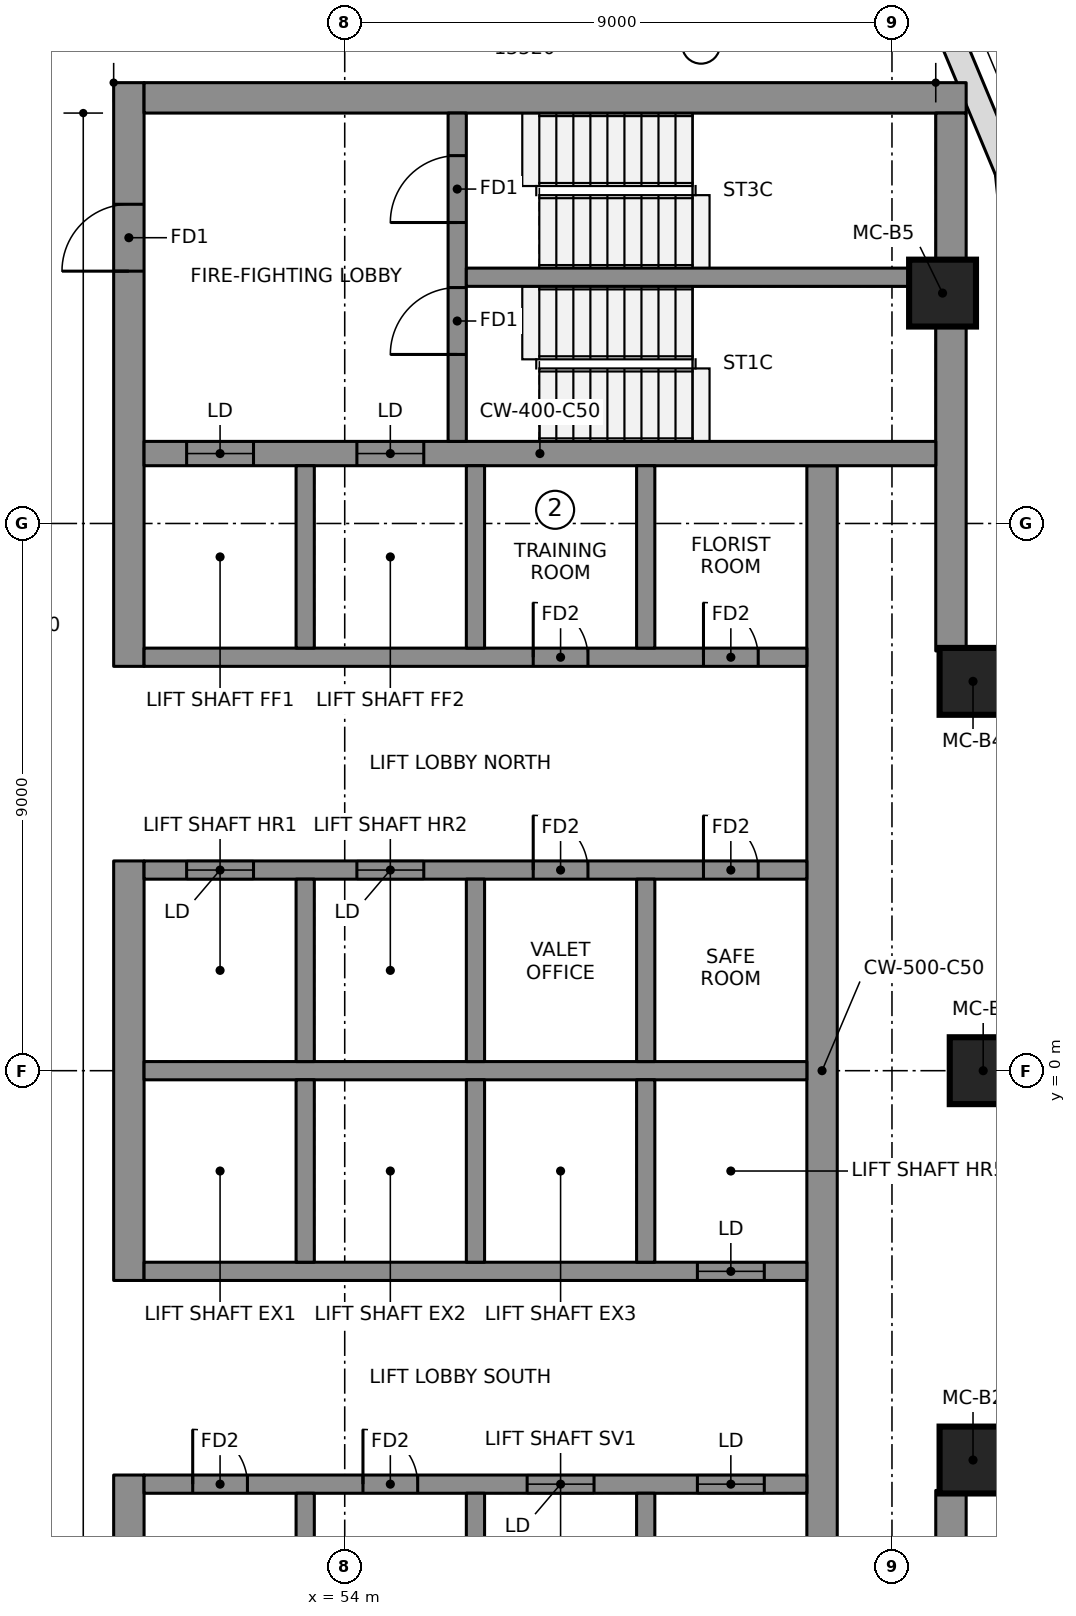
"""IFC4 building model, lengths in metres.
Left out: names, types, materials, properties, quantities, classifications, styles, units other than length and angle.
Written with IfcOpenShell. Run it as: python <this file> out.ifc"""

import sys

from ifc_helpers import new_model, si_unit, direction, frame, frame_2d, origin, origin_2d, place, context, subcontext, project, spatial, polyline, rectangle, outline, extrude, element, fill, save


model = new_model("IFC4")
c1 = context("Model", 3, precision=1e-05, world=origin(), true_north=direction((0.0, 1.0)))
c2 = subcontext(c1, "Body", "Model", "MODEL_VIEW")
j1 = project(units=[si_unit("LENGTHUNIT", "METRE"), si_unit("PLANEANGLEUNIT", "RADIAN")], contexts=[c1])
p1 = place(None, origin())
s1 = spatial("IfcSite", under=j1, at=p1, CompositionType="ELEMENT")
p2 = place(p1, origin())
s2 = spatial("IfcBuilding", under=s1, at=p2, CompositionType="ELEMENT")
p3 = place(p2, frame((0.0, 0.0, 278.55)))
s3 = spatial("IfcBuildingStorey", under=s2, at=p3, CompositionType="ELEMENT", Elevation=278.55)
p4 = place(p3, frame((50.45, 6.65, 0.0), z_axis=(0.0, 0.0, 1.0), x_axis=(0.0, 1.0, 0.0)))
e1 = element("IfcWall", 1, at=p4, inside=s3, PredefinedType="SHEAR", context=c2, shape_type="SweptSolid", body=[
    extrude(rectangle(XDim=9.6, YDim=0.5, at=frame_2d((4.8, 0.0))), origin(), (0.0, 0.0, 1.0), 3.55),
])
p5 = place(p4, frame((6.5, 0.0, 0.0)))
e2 = element("IfcOpeningElement", 2, at=p5, cuts=e1, PredefinedType="OPENING", context=c2, shape_type="SweptSolid", body=[
    extrude(rectangle(XDim=1.1, YDim=2.1, at=frame_2d((0.55, 1.05))), frame((0.0, 0.26, 0.0), z_axis=(0.0, -1.0, 0.0), x_axis=(1.0, 0.0, 0.0)), (0.0, 0.0, 1.0), 0.52),
])
p6 = place(p3, frame((50.45, -3.45, 0.0), z_axis=(0.0, 0.0, 1.0), x_axis=(0.0, 1.0, 0.0)))
e3 = element("IfcWall", 3, at=p6, inside=s3, PredefinedType="SHEAR", context=c2, shape_type="SweptSolid", body=[
    extrude(rectangle(XDim=6.9, YDim=0.5, at=frame_2d((3.45, 0.0))), origin(), (0.0, 0.0, 1.0), 3.55),
])
p7 = place(p3, frame((50.45, -16.25, 0.0), z_axis=(0.0, 0.0, 1.0), x_axis=(0.0, 1.0, 0.0)))
e4 = element("IfcWall", 4, at=p7, inside=s3, PredefinedType="SHEAR", context=c2, shape_type="SweptSolid", body=[
    extrude(rectangle(XDim=9.6, YDim=0.5, at=frame_2d((4.8, 0.0))), origin(), (0.0, 0.0, 1.0), 3.55),
])
p8 = place(p7, frame((2.0, 0.0, 0.0)))
e5 = element("IfcOpeningElement", 5, at=p8, cuts=e4, PredefinedType="OPENING", context=c2, shape_type="SweptSolid", body=[
    extrude(rectangle(XDim=1.1, YDim=2.1, at=frame_2d((0.55, 1.05))), frame((0.0, 0.26, 0.0), z_axis=(0.0, -1.0, 0.0), x_axis=(1.0, 0.0, 0.0)), (0.0, 0.0, 1.0), 0.52),
])
p9 = place(p3, frame((50.7, 16.0, 0.0), z_axis=(0.0, 0.0, 1.0), x_axis=(1.0, 0.0, 0.0)))
e6 = element("IfcWall", 6, at=p9, inside=s3, PredefinedType="SHEAR", context=c2, shape_type="SweptSolid", body=[
    extrude(rectangle(XDim=13.52, YDim=0.5, at=frame_2d((6.76, 0.0))), origin(), (0.0, 0.0, 1.0), 3.55),
])
for number, where, z_axis, x_axis in (
    (7, (63.97, 6.903, 0.0), (0.0, 0.0, 1.0), (0.0, 1.0, 0.0)),
    (8, (63.97, -15.75, 0.0), (0.0, 0.0, 1.0), (0.0, 1.0, 0.0)),
):
    element("IfcWall", number, at=place(p3, frame(where, z_axis=z_axis, x_axis=x_axis)), inside=s3, PredefinedType="SHEAR", context=c2, shape_type="SweptSolid", body=[
        extrude(rectangle(XDim=8.847, YDim=0.5, at=frame_2d((4.423, 0.0))), origin(), (0.0, 0.0, 1.0), 3.55),
    ])
p10 = place(p3, frame((61.85, -9.95, 0.0), z_axis=(0.0, 0.0, 1.0), x_axis=(0.0, 1.0, 0.0)))
e9 = element("IfcWall", 9, at=p10, inside=s3, PredefinedType="SHEAR", context=c2, shape_type="SweptSolid", body=[
    extrude(rectangle(XDim=19.9, YDim=0.5, at=frame_2d((9.95, 0.0))), origin(), (0.0, 0.0, 1.0), 3.55),
])
p11 = place(p3, frame((50.7, 10.15, 0.0), z_axis=(0.0, 0.0, 1.0), x_axis=(1.0, 0.0, 0.0)))
e10 = element("IfcWall", 10, at=p11, inside=s3, PredefinedType="SHEAR", context=c2, shape_type="SweptSolid", body=[
    extrude(rectangle(XDim=13.02, YDim=0.4, at=frame_2d((6.51, 0.0))), origin(), (0.0, 0.0, 1.0), 3.55),
])
p12 = place(p11, frame((0.7, 0.0, 0.0)))
e11 = element("IfcOpeningElement", 11, at=p12, cuts=e10, PredefinedType="OPENING", context=c2, shape_type="SweptSolid", body=[
    extrude(rectangle(XDim=1.1, YDim=2.1, at=frame_2d((0.55, 1.05))), frame((0.0, 0.21, 0.0), z_axis=(0.0, -1.0, 0.0), x_axis=(1.0, 0.0, 0.0)), (0.0, 0.0, 1.0), 0.42),
])
p13 = place(p11, frame((3.5, 0.0, 0.0)))
e12 = element("IfcOpeningElement", 12, at=p13, cuts=e10, PredefinedType="OPENING", context=c2, shape_type="SweptSolid", body=[
    extrude(rectangle(XDim=1.1, YDim=2.1, at=frame_2d((0.55, 1.05))), frame((0.0, 0.21, 0.0), z_axis=(0.0, -1.0, 0.0), x_axis=(1.0, 0.0, 0.0)), (0.0, 0.0, 1.0), 0.42),
])
p14 = place(p3, frame((50.7, 0.0, 0.0), z_axis=(0.0, 0.0, 1.0), x_axis=(1.0, 0.0, 0.0)))
e13 = element("IfcWall", 13, at=p14, inside=s3, PredefinedType="SHEAR", context=c2, shape_type="SweptSolid", body=[
    extrude(rectangle(XDim=10.9, YDim=0.3, at=frame_2d((5.45, 0.0))), origin(), (0.0, 0.0, 1.0), 3.55),
])
p15 = place(p3, frame((50.7, 3.3, 0.0), z_axis=(0.0, 0.0, 1.0), x_axis=(1.0, 0.0, 0.0)))
e14 = element("IfcWall", 14, at=p15, inside=s3, PredefinedType="SHEAR", context=c2, shape_type="SweptSolid", body=[
    extrude(rectangle(XDim=10.9, YDim=0.3, at=frame_2d((5.45, 0.0))), origin(), (0.0, 0.0, 1.0), 3.55),
])
p16 = place(p15, frame((0.7, 0.0, 0.0)))
e15 = element("IfcOpeningElement", 15, at=p16, cuts=e14, PredefinedType="OPENING", context=c2, shape_type="SweptSolid", body=[
    extrude(rectangle(XDim=1.1, YDim=2.1, at=frame_2d((0.55, 1.05))), frame((0.0, 0.16, 0.0), z_axis=(0.0, -1.0, 0.0), x_axis=(1.0, 0.0, 0.0)), (0.0, 0.0, 1.0), 0.32),
])
p17 = place(p15, frame((3.5, 0.0, 0.0)))
e16 = element("IfcOpeningElement", 16, at=p17, cuts=e14, PredefinedType="OPENING", context=c2, shape_type="SweptSolid", body=[
    extrude(rectangle(XDim=1.1, YDim=2.1, at=frame_2d((0.55, 1.05))), frame((0.0, 0.16, 0.0), z_axis=(0.0, -1.0, 0.0), x_axis=(1.0, 0.0, 0.0)), (0.0, 0.0, 1.0), 0.32),
])
p18 = place(p15, frame((6.4, 0.0, 0.0)))
e17 = element("IfcOpeningElement", 17, at=p18, cuts=e14, PredefinedType="OPENING", context=c2, shape_type="SweptSolid", body=[
    extrude(rectangle(XDim=0.9, YDim=2.1, at=frame_2d((0.45, 1.05))), frame((0.0, 0.16, 0.0), z_axis=(0.0, -1.0, 0.0), x_axis=(1.0, 0.0, 0.0)), (0.0, 0.0, 1.0), 0.32),
])
p19 = place(p15, frame((9.2, 0.0, 0.0)))
e18 = element("IfcOpeningElement", 18, at=p19, cuts=e14, PredefinedType="OPENING", context=c2, shape_type="SweptSolid", body=[
    extrude(rectangle(XDim=0.9, YDim=2.1, at=frame_2d((0.45, 1.05))), frame((0.0, 0.16, 0.0), z_axis=(0.0, -1.0, 0.0), x_axis=(1.0, 0.0, 0.0)), (0.0, 0.0, 1.0), 0.32),
])
p20 = place(p3, frame((50.7, 6.8, 0.0), z_axis=(0.0, 0.0, 1.0), x_axis=(1.0, 0.0, 0.0)))
e19 = element("IfcWall", 19, at=p20, inside=s3, PredefinedType="SHEAR", context=c2, shape_type="SweptSolid", body=[
    extrude(rectangle(XDim=10.9, YDim=0.3, at=frame_2d((5.45, 0.0))), origin(), (0.0, 0.0, 1.0), 3.55),
])
p21 = place(p20, frame((6.4, 0.0, 0.0)))
e20 = element("IfcOpeningElement", 20, at=p21, cuts=e19, PredefinedType="OPENING", context=c2, shape_type="SweptSolid", body=[
    extrude(rectangle(XDim=0.9, YDim=2.1, at=frame_2d((0.45, 1.05))), frame((0.0, 0.16, 0.0), z_axis=(0.0, -1.0, 0.0), x_axis=(1.0, 0.0, 0.0)), (0.0, 0.0, 1.0), 0.32),
])
p22 = place(p20, frame((9.2, 0.0, 0.0)))
e21 = element("IfcOpeningElement", 21, at=p22, cuts=e19, PredefinedType="OPENING", context=c2, shape_type="SweptSolid", body=[
    extrude(rectangle(XDim=0.9, YDim=2.1, at=frame_2d((0.45, 1.05))), frame((0.0, 0.16, 0.0), z_axis=(0.0, -1.0, 0.0), x_axis=(1.0, 0.0, 0.0)), (0.0, 0.0, 1.0), 0.32),
])
for number, where, z_axis, x_axis in (
    (22, (53.35, 0.15, 0.0), (0.0, 0.0, 1.0), (0.0, 1.0, 0.0)),
    (23, (53.35, 6.95, 0.0), (0.0, 0.0, 1.0), (0.0, 1.0, 0.0)),
    (24, (56.15, 0.15, 0.0), (0.0, 0.0, 1.0), (0.0, 1.0, 0.0)),
    (25, (56.15, 6.95, 0.0), (0.0, 0.0, 1.0), (0.0, 1.0, 0.0)),
    (26, (58.95, 0.15, 0.0), (0.0, 0.0, 1.0), (0.0, 1.0, 0.0)),
    (27, (58.95, 6.95, 0.0), (0.0, 0.0, 1.0), (0.0, 1.0, 0.0)),
):
    element("IfcWall", number, at=place(p3, frame(where, z_axis=z_axis, x_axis=x_axis)), inside=s3, PredefinedType="SHEAR", context=c2, shape_type="SweptSolid", body=[
        extrude(rectangle(XDim=3.0, YDim=0.3, at=frame_2d((1.5, 0.0))), origin(), (0.0, 0.0, 1.0), 3.55),
    ])
p23 = place(p3, frame((50.7, -3.3, 0.0), z_axis=(0.0, 0.0, 1.0), x_axis=(1.0, 0.0, 0.0)))
e28 = element("IfcWall", 28, at=p23, inside=s3, PredefinedType="SHEAR", context=c2, shape_type="SweptSolid", body=[
    extrude(rectangle(XDim=10.9, YDim=0.3, at=frame_2d((5.45, 0.0))), origin(), (0.0, 0.0, 1.0), 3.55),
])
p24 = place(p23, frame((9.1, 0.0, 0.0)))
e29 = element("IfcOpeningElement", 29, at=p24, cuts=e28, PredefinedType="OPENING", context=c2, shape_type="SweptSolid", body=[
    extrude(rectangle(XDim=1.1, YDim=2.1, at=frame_2d((0.55, 1.05))), frame((0.0, 0.16, 0.0), z_axis=(0.0, -1.0, 0.0), x_axis=(1.0, 0.0, 0.0)), (0.0, 0.0, 1.0), 0.32),
])
p25 = place(p3, frame((50.7, -6.8, 0.0), z_axis=(0.0, 0.0, 1.0), x_axis=(1.0, 0.0, 0.0)))
e30 = element("IfcWall", 30, at=p25, inside=s3, PredefinedType="SHEAR", context=c2, shape_type="SweptSolid", body=[
    extrude(rectangle(XDim=10.9, YDim=0.3, at=frame_2d((5.45, 0.0))), origin(), (0.0, 0.0, 1.0), 3.55),
])
p26 = place(p25, frame((6.3, 0.0, 0.0)))
e31 = element("IfcOpeningElement", 31, at=p26, cuts=e30, PredefinedType="OPENING", context=c2, shape_type="SweptSolid", body=[
    extrude(rectangle(XDim=1.1, YDim=2.1, at=frame_2d((0.55, 1.05))), frame((0.0, 0.16, 0.0), z_axis=(0.0, -1.0, 0.0), x_axis=(1.0, 0.0, 0.0)), (0.0, 0.0, 1.0), 0.32),
])
p27 = place(p25, frame((9.1, 0.0, 0.0)))
e32 = element("IfcOpeningElement", 32, at=p27, cuts=e30, PredefinedType="OPENING", context=c2, shape_type="SweptSolid", body=[
    extrude(rectangle(XDim=1.1, YDim=2.1, at=frame_2d((0.55, 1.05))), frame((0.0, 0.16, 0.0), z_axis=(0.0, -1.0, 0.0), x_axis=(1.0, 0.0, 0.0)), (0.0, 0.0, 1.0), 0.32),
])
p28 = place(p25, frame((0.8, 0.0, 0.0)))
e33 = element("IfcOpeningElement", 33, at=p28, cuts=e30, PredefinedType="OPENING", context=c2, shape_type="SweptSolid", body=[
    extrude(rectangle(XDim=0.9, YDim=2.1, at=frame_2d((0.45, 1.05))), frame((0.0, 0.16, 0.0), z_axis=(0.0, -1.0, 0.0), x_axis=(1.0, 0.0, 0.0)), (0.0, 0.0, 1.0), 0.32),
])
p29 = place(p25, frame((3.6, 0.0, 0.0)))
e34 = element("IfcOpeningElement", 34, at=p29, cuts=e30, PredefinedType="OPENING", context=c2, shape_type="SweptSolid", body=[
    extrude(rectangle(XDim=0.9, YDim=2.1, at=frame_2d((0.45, 1.05))), frame((0.0, 0.16, 0.0), z_axis=(0.0, -1.0, 0.0), x_axis=(1.0, 0.0, 0.0)), (0.0, 0.0, 1.0), 0.32),
])
for number, where, z_axis, x_axis in (
    (35, (53.35, -3.15, 0.0), (0.0, 0.0, 1.0), (0.0, 1.0, 0.0)),
    (36, (53.35, -9.95, 0.0), (0.0, 0.0, 1.0), (0.0, 1.0, 0.0)),
    (37, (56.15, -3.15, 0.0), (0.0, 0.0, 1.0), (0.0, 1.0, 0.0)),
    (38, (56.15, -9.95, 0.0), (0.0, 0.0, 1.0), (0.0, 1.0, 0.0)),
    (39, (58.95, -3.15, 0.0), (0.0, 0.0, 1.0), (0.0, 1.0, 0.0)),
    (40, (58.95, -9.95, 0.0), (0.0, 0.0, 1.0), (0.0, 1.0, 0.0)),
):
    element("IfcWall", number, at=place(p3, frame(where, z_axis=z_axis, x_axis=x_axis)), inside=s3, PredefinedType="SHEAR", context=c2, shape_type="SweptSolid", body=[
        extrude(rectangle(XDim=3.0, YDim=0.3, at=frame_2d((1.5, 0.0))), origin(), (0.0, 0.0, 1.0), 3.55),
    ])
p30 = place(p3, frame((55.85, 10.35, 0.0), z_axis=(0.0, 0.0, 1.0), x_axis=(0.0, 1.0, 0.0)))
e41 = element("IfcWall", 41, at=p30, inside=s3, PredefinedType="SHEAR", context=c2, shape_type="SweptSolid", body=[
    extrude(rectangle(XDim=5.4, YDim=0.3, at=frame_2d((2.7, 0.0))), origin(), (0.0, 0.0, 1.0), 3.55),
])
p31 = place(p30, frame((1.43, 0.0, 0.0)))
e42 = element("IfcOpeningElement", 42, at=p31, cuts=e41, PredefinedType="OPENING", context=c2, shape_type="SweptSolid", body=[
    extrude(rectangle(XDim=1.1, YDim=2.1, at=frame_2d((0.55, 1.05))), frame((0.0, 0.16, 0.0), z_axis=(0.0, -1.0, 0.0), x_axis=(1.0, 0.0, 0.0)), (0.0, 0.0, 1.0), 0.32),
])
p32 = place(p30, frame((3.6, 0.0, 0.0)))
e43 = element("IfcOpeningElement", 43, at=p32, cuts=e41, PredefinedType="OPENING", context=c2, shape_type="SweptSolid", body=[
    extrude(rectangle(XDim=1.1, YDim=2.1, at=frame_2d((0.55, 1.05))), frame((0.0, 0.16, 0.0), z_axis=(0.0, -1.0, 0.0), x_axis=(1.0, 0.0, 0.0)), (0.0, 0.0, 1.0), 0.32),
])
p33 = place(p3, frame((56.0, 13.05, 0.0), z_axis=(0.0, 0.0, 1.0), x_axis=(1.0, 0.0, 0.0)))
e44 = element("IfcWall", 44, at=p33, inside=s3, PredefinedType="SHEAR", context=c2, shape_type="SweptSolid", body=[
    extrude(rectangle(XDim=7.72, YDim=0.3, at=frame_2d((3.86, 0.0))), origin(), (0.0, 0.0, 1.0), 3.55),
])
for number, where, z_axis, x_axis in (
    (45, (64.333, -6.403, 0.0), (0.0, 0.0, 1.0), (1.0, 0.0, 0.0)),
    (46, (64.5, 0.0, 0.0), (0.0, 0.0, 1.0), (1.0, 0.0, 0.0)),
    (47, (64.333, 6.403, 0.0), (0.0, 0.0, 1.0), (1.0, 0.0, 0.0)),
    (48, (63.832, 12.789, 0.0), (0.0, 0.0, 1.0), (1.0, 0.0, 0.0)),
):
    element("IfcColumn", number, at=place(p3, frame(where, z_axis=z_axis, x_axis=x_axis)), inside=s3, PredefinedType="COLUMN", context=c2, shape_type="SweptSolid", body=[
        extrude(rectangle(XDim=1.1, YDim=1.1, at=origin_2d()), origin(), (0.0, 0.0, 1.0), 3.55),
    ])
p34 = place(p3, frame((65.331, 10.571, 0.0), z_axis=(0.0, 0.0, 1.0), x_axis=(-0.102249826987, 0.994758751096, 0.0)))
e49 = element("IfcWall", 49, at=p34, inside=s3, PredefinedType="NOTDEFINED", context=c2, shape_type="SweptSolid", body=[
    extrude(outline(polyline([(-0.003, -0.2), (4.263, -0.2), (4.204, 0.2), (0.003, 0.2), (-0.003, -0.2)])), origin(), (0.0, 0.0, 1.0), 3.25),
])
p35 = place(p3, frame((64.898, 14.782, 0.0), z_axis=(0.0, 0.0, 1.0), x_axis=(-0.385285857918, 0.922797273343, 0.0)))
e50 = element("IfcWall", 50, at=p35, inside=s3, PredefinedType="NOTDEFINED", context=c2, shape_type="SweptSolid", body=[
    extrude(outline(polyline([(-0.03, -0.2), (3.753, -0.2), (3.64, 0.2), (0.03, 0.2), (-0.03, -0.2)])), origin(), (0.0, 0.0, 1.0), 3.25),
])
p36 = place(p12, origin())
e51 = element("IfcDoor", 51, at=p36, inside=s3, OperationType="DOUBLE_DOOR_SLIDING", PredefinedType="DOOR", context=c2, shape_type="SweptSolid", body=[
    extrude(rectangle(XDim=1.1, YDim=2.1, at=frame_2d((0.55, 1.05))), frame((0.0, 0.025, 0.0), z_axis=(0.0, -1.0, 0.0), x_axis=(1.0, 0.0, 0.0)), (0.0, 0.0, 1.0), 0.05),
])
fill(e11, e51)
p37 = place(p13, origin())
e52 = element("IfcDoor", 52, at=p37, inside=s3, OperationType="DOUBLE_DOOR_SLIDING", PredefinedType="DOOR", context=c2, shape_type="SweptSolid", body=[
    extrude(rectangle(XDim=1.1, YDim=2.1, at=frame_2d((0.55, 1.05))), frame((0.0, 0.025, 0.0), z_axis=(0.0, -1.0, 0.0), x_axis=(1.0, 0.0, 0.0)), (0.0, 0.0, 1.0), 0.05),
])
fill(e12, e52)
p38 = place(p16, origin())
e53 = element("IfcDoor", 53, at=p38, inside=s3, OperationType="DOUBLE_DOOR_SLIDING", PredefinedType="DOOR", context=c2, shape_type="SweptSolid", body=[
    extrude(rectangle(XDim=1.1, YDim=2.1, at=frame_2d((0.55, 1.05))), frame((0.0, 0.025, 0.0), z_axis=(0.0, -1.0, 0.0), x_axis=(1.0, 0.0, 0.0)), (0.0, 0.0, 1.0), 0.05),
])
fill(e15, e53)
p39 = place(p17, origin())
e54 = element("IfcDoor", 54, at=p39, inside=s3, OperationType="DOUBLE_DOOR_SLIDING", PredefinedType="DOOR", context=c2, shape_type="SweptSolid", body=[
    extrude(rectangle(XDim=1.1, YDim=2.1, at=frame_2d((0.55, 1.05))), frame((0.0, 0.025, 0.0), z_axis=(0.0, -1.0, 0.0), x_axis=(1.0, 0.0, 0.0)), (0.0, 0.0, 1.0), 0.05),
])
fill(e16, e54)
p40 = place(p24, origin())
e55 = element("IfcDoor", 55, at=p40, inside=s3, OperationType="DOUBLE_DOOR_SLIDING", PredefinedType="DOOR", context=c2, shape_type="SweptSolid", body=[
    extrude(rectangle(XDim=1.1, YDim=2.1, at=frame_2d((0.55, 1.05))), frame((0.0, 0.025, 0.0), z_axis=(0.0, -1.0, 0.0), x_axis=(1.0, 0.0, 0.0)), (0.0, 0.0, 1.0), 0.05),
])
fill(e29, e55)
p41 = place(p26, origin())
e56 = element("IfcDoor", 56, at=p41, inside=s3, OperationType="DOUBLE_DOOR_SLIDING", PredefinedType="DOOR", context=c2, shape_type="SweptSolid", body=[
    extrude(rectangle(XDim=1.1, YDim=2.1, at=frame_2d((0.55, 1.05))), frame((0.0, 0.025, 0.0), z_axis=(0.0, -1.0, 0.0), x_axis=(1.0, 0.0, 0.0)), (0.0, 0.0, 1.0), 0.05),
])
fill(e31, e56)
p42 = place(p27, origin())
e57 = element("IfcDoor", 57, at=p42, inside=s3, OperationType="DOUBLE_DOOR_SLIDING", PredefinedType="DOOR", context=c2, shape_type="SweptSolid", body=[
    extrude(rectangle(XDim=1.1, YDim=2.1, at=frame_2d((0.55, 1.05))), frame((0.0, 0.025, 0.0), z_axis=(0.0, -1.0, 0.0), x_axis=(1.0, 0.0, 0.0)), (0.0, 0.0, 1.0), 0.05),
])
fill(e32, e57)
p43 = place(p31, origin())
e58 = element("IfcDoor", 58, at=p43, inside=s3, OperationType="SINGLE_SWING_RIGHT", PredefinedType="DOOR", context=c2, shape_type="SweptSolid", body=[
    extrude(rectangle(XDim=1.1, YDim=2.1, at=frame_2d((0.55, 1.05))), frame((0.0, 0.025, 0.0), z_axis=(0.0, -1.0, 0.0), x_axis=(1.0, 0.0, 0.0)), (0.0, 0.0, 1.0), 0.05),
])
fill(e42, e58)
p44 = place(p32, origin())
e59 = element("IfcDoor", 59, at=p44, inside=s3, OperationType="SINGLE_SWING_RIGHT", PredefinedType="DOOR", context=c2, shape_type="SweptSolid", body=[
    extrude(rectangle(XDim=1.1, YDim=2.1, at=frame_2d((0.55, 1.05))), frame((0.0, 0.025, 0.0), z_axis=(0.0, -1.0, 0.0), x_axis=(1.0, 0.0, 0.0)), (0.0, 0.0, 1.0), 0.05),
])
fill(e43, e59)
p45 = place(p5, origin())
e60 = element("IfcDoor", 60, at=p45, inside=s3, OperationType="SINGLE_SWING_RIGHT", PredefinedType="DOOR", context=c2, shape_type="SweptSolid", body=[
    extrude(rectangle(XDim=1.1, YDim=2.1, at=frame_2d((0.55, 1.05))), frame((0.0, 0.025, 0.0), z_axis=(0.0, -1.0, 0.0), x_axis=(1.0, 0.0, 0.0)), (0.0, 0.0, 1.0), 0.05),
])
fill(e2, e60)
p46 = place(p21, origin())
e61 = element("IfcDoor", 61, at=p46, inside=s3, OperationType="SINGLE_SWING_LEFT", PredefinedType="DOOR", context=c2, shape_type="SweptSolid", body=[
    extrude(rectangle(XDim=0.9, YDim=2.1, at=frame_2d((0.45, 1.05))), frame((0.0, 0.025, 0.0), z_axis=(0.0, -1.0, 0.0), x_axis=(1.0, 0.0, 0.0)), (0.0, 0.0, 1.0), 0.05),
])
fill(e20, e61)
p47 = place(p22, origin())
e62 = element("IfcDoor", 62, at=p47, inside=s3, OperationType="SINGLE_SWING_LEFT", PredefinedType="DOOR", context=c2, shape_type="SweptSolid", body=[
    extrude(rectangle(XDim=0.9, YDim=2.1, at=frame_2d((0.45, 1.05))), frame((0.0, 0.025, 0.0), z_axis=(0.0, -1.0, 0.0), x_axis=(1.0, 0.0, 0.0)), (0.0, 0.0, 1.0), 0.05),
])
fill(e21, e62)
p48 = place(p18, origin())
e63 = element("IfcDoor", 63, at=p48, inside=s3, OperationType="SINGLE_SWING_LEFT", PredefinedType="DOOR", context=c2, shape_type="SweptSolid", body=[
    extrude(rectangle(XDim=0.9, YDim=2.1, at=frame_2d((0.45, 1.05))), frame((0.0, 0.025, 0.0), z_axis=(0.0, -1.0, 0.0), x_axis=(1.0, 0.0, 0.0)), (0.0, 0.0, 1.0), 0.05),
])
fill(e17, e63)
p49 = place(p19, origin())
e64 = element("IfcDoor", 64, at=p49, inside=s3, OperationType="SINGLE_SWING_LEFT", PredefinedType="DOOR", context=c2, shape_type="SweptSolid", body=[
    extrude(rectangle(XDim=0.9, YDim=2.1, at=frame_2d((0.45, 1.05))), frame((0.0, 0.025, 0.0), z_axis=(0.0, -1.0, 0.0), x_axis=(1.0, 0.0, 0.0)), (0.0, 0.0, 1.0), 0.05),
])
fill(e18, e64)
p50 = place(p28, origin())
e65 = element("IfcDoor", 65, at=p50, inside=s3, OperationType="SINGLE_SWING_LEFT", PredefinedType="DOOR", context=c2, shape_type="SweptSolid", body=[
    extrude(rectangle(XDim=0.9, YDim=2.1, at=frame_2d((0.45, 1.05))), frame((0.0, 0.025, 0.0), z_axis=(0.0, -1.0, 0.0), x_axis=(1.0, 0.0, 0.0)), (0.0, 0.0, 1.0), 0.05),
])
fill(e33, e65)
p51 = place(p29, origin())
e66 = element("IfcDoor", 66, at=p51, inside=s3, OperationType="SINGLE_SWING_LEFT", PredefinedType="DOOR", context=c2, shape_type="SweptSolid", body=[
    extrude(rectangle(XDim=0.9, YDim=2.1, at=frame_2d((0.45, 1.05))), frame((0.0, 0.025, 0.0), z_axis=(0.0, -1.0, 0.0), x_axis=(1.0, 0.0, 0.0)), (0.0, 0.0, 1.0), 0.05),
])
fill(e34, e66)
save(model, sys.argv[1])
